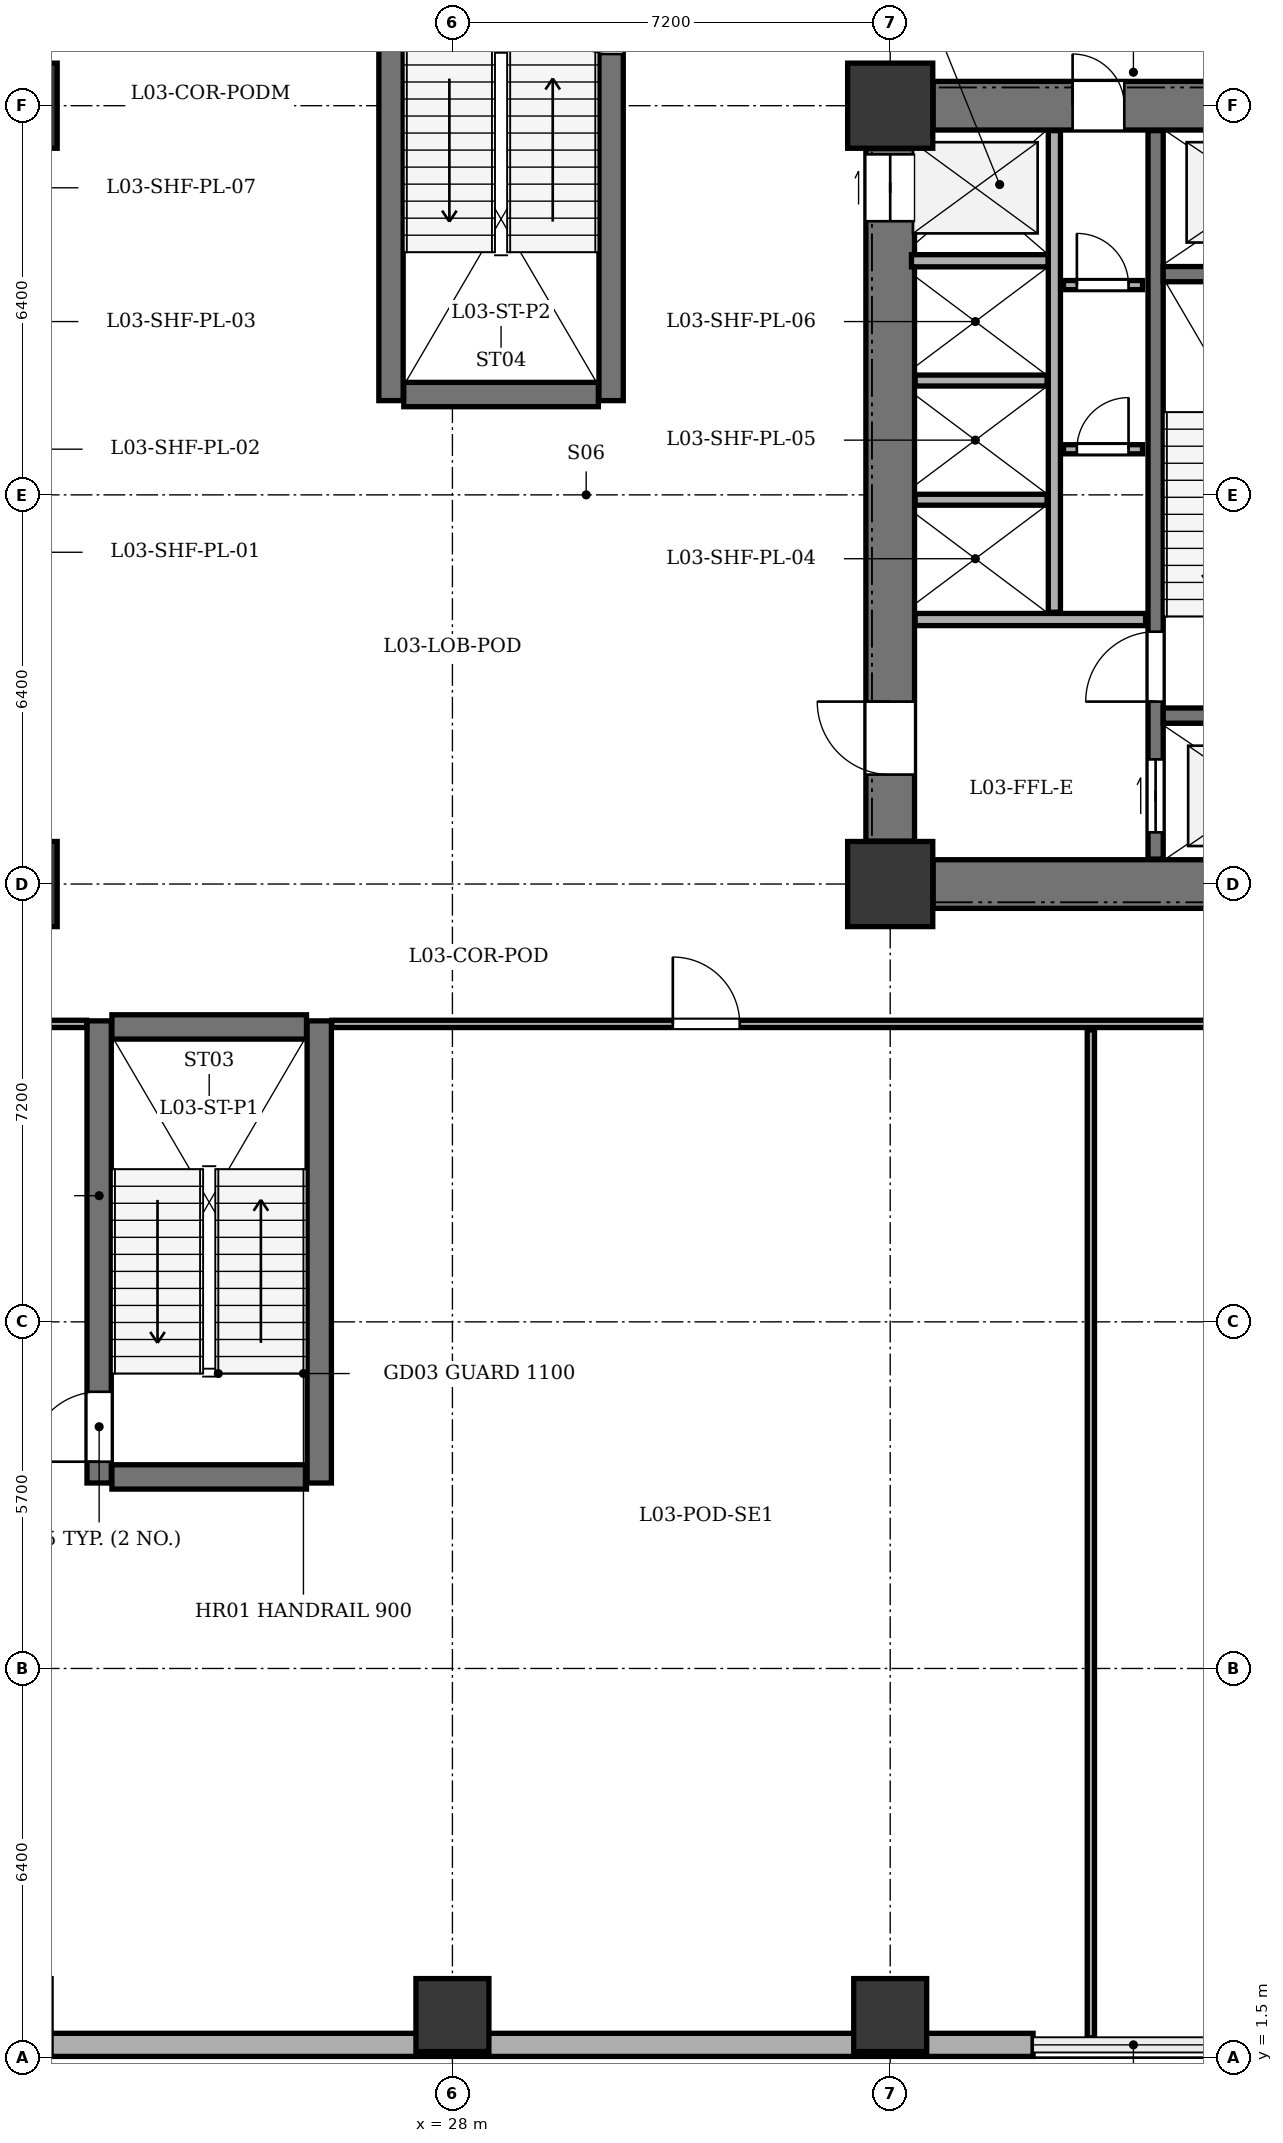
"""IFC4 building model, lengths in metres.
Left out: names, types, materials, properties, quantities, classifications, styles, units other than length and angle.
Written with IfcOpenShell. Run it as: python <this file> out.ifc"""

import sys

from ifc_helpers import new_model, si_unit, direction, frame, frame_2d, origin, origin_2d, place, context, subcontext, project, spatial, rectangle, extrude, element, fill, save


model = new_model("IFC4")
c1 = context("Model", 3, precision=1e-05, world=origin(), true_north=direction((0.0, 1.0)))
c2 = subcontext(c1, "Body", "Model", "MODEL_VIEW")
j1 = project(units=[si_unit("LENGTHUNIT", "METRE"), si_unit("PLANEANGLEUNIT", "RADIAN")], contexts=[c1])
p1 = place(None, origin())
s1 = spatial("IfcSite", under=j1, at=p1, CompositionType="ELEMENT")
p2 = place(p1, origin())
s2 = spatial("IfcBuilding", under=s1, at=p2, CompositionType="ELEMENT")
p3 = place(p2, frame((0.0, 0.0, 14.4)))
s3 = spatial("IfcBuildingStorey", under=s2, at=p3, CompositionType="ELEMENT", Elevation=14.4)
for number, where, z_axis, x_axis in (
    (1, (20.8, 20.8, 0.0), (0.0, 0.0, 1.0), (1.0, 0.0, 0.0)),
    (2, (20.8, 33.6, 0.0), (0.0, 0.0, 1.0), (1.0, 0.0, 0.0)),
    (3, (35.2, 20.8, 0.0), (0.0, 0.0, 1.0), (1.0, 0.0, 0.0)),
    (4, (35.2, 33.6, 0.0), (0.0, 0.0, 1.0), (1.0, 0.0, 0.0)),
):
    element("IfcColumn", number, at=place(p3, frame(where, z_axis=z_axis, x_axis=x_axis)), inside=s3, PredefinedType="COLUMN", context=c2, shape_type="SweptSolid", body=[
        extrude(rectangle(XDim=1.4, YDim=1.4, at=origin_2d()), origin(), (0.0, 0.0, 1.0), 4.5),
    ])
for number, where, z_axis, x_axis in (
    (5, (28.0, 2.2, 0.0), (0.0, 0.0, 1.0), (1.0, 0.0, 0.0)),
    (6, (35.2, 2.2, 0.0), (0.0, 0.0, 1.0), (1.0, 0.0, 0.0)),
):
    element("IfcColumn", number, at=place(p3, frame(where, z_axis=z_axis, x_axis=x_axis)), inside=s3, PredefinedType="COLUMN", context=c2, shape_type="SweptSolid", body=[
        extrude(rectangle(XDim=1.2, YDim=1.2, at=origin_2d()), origin(), (0.0, 0.0, 1.0), 4.5),
    ])
p4 = place(p3, frame((37.55, 1.71, 0.0), z_axis=(0.0, 0.0, 1.0), x_axis=(-1.0, 0.0, 0.0)))
e7 = element("IfcWall", 7, at=p4, inside=s3, PredefinedType="STANDARD", context=c2, shape_type="SweptSolid", body=[
    extrude(rectangle(XDim=32.15, YDim=0.38, at=frame_2d((16.075, 0.0))), origin(), (0.0, 0.0, 1.0), 4.0),
])
p5 = place(p3, frame((35.905, 20.8, 0.0), z_axis=(0.0, 0.0, 1.0), x_axis=(1.0, 0.0, 0.0)))
e8 = element("IfcWall", 8, at=p5, inside=s3, PredefinedType="SHEAR", context=c2, shape_type="SweptSolid", body=[
    extrude(rectangle(XDim=6.59, YDim=0.8, at=frame_2d((3.295, 0.0))), origin(), (0.0, 0.0, 1.0), 4.0),
])
p6 = place(p3, frame((35.905, 33.6, 0.0), z_axis=(0.0, 0.0, 1.0), x_axis=(1.0, 0.0, 0.0)))
e9 = element("IfcWall", 9, at=p6, inside=s3, PredefinedType="SHEAR", context=c2, shape_type="SweptSolid", body=[
    extrude(rectangle(XDim=6.59, YDim=0.8, at=frame_2d((3.295, 0.0))), origin(), (0.0, 0.0, 1.0), 4.0),
])
p7 = place(p6, frame((4.495, 0.0, 0.0)))
e10 = element("IfcOpeningElement", 10, at=p7, cuts=e9, PredefinedType="OPENING", context=c2, shape_type="SweptSolid", body=[
    extrude(rectangle(XDim=1.3, YDim=2.15, at=frame_2d((0.65, 1.075))), frame((0.0, 0.41, 0.0), z_axis=(0.0, -1.0, 0.0), x_axis=(1.0, 0.0, 0.0)), (0.0, 0.0, 1.0), 0.82),
])
p8 = place(p6, frame((2.295, 0.0, 0.0)))
e11 = element("IfcOpeningElement", 11, at=p8, cuts=e9, PredefinedType="OPENING", context=c2, shape_type="SweptSolid", body=[
    extrude(rectangle(XDim=0.85, YDim=2.02, at=frame_2d((0.425, 1.01))), frame((0.0, 0.41, 0.0), z_axis=(0.0, -1.0, 0.0), x_axis=(1.0, 0.0, 0.0)), (0.0, 0.0, 1.0), 0.82),
])
p9 = place(p3, frame((35.2, 21.505, 0.0), z_axis=(0.0, 0.0, 1.0), x_axis=(0.0, 1.0, 0.0)))
e12 = element("IfcWall", 12, at=p9, inside=s3, PredefinedType="SHEAR", context=c2, shape_type="SweptSolid", body=[
    extrude(rectangle(XDim=11.39, YDim=0.8, at=frame_2d((5.695, 0.0))), origin(), (0.0, 0.0, 1.0), 4.0),
])
p10 = place(p9, frame((1.095, 0.0, 0.0)))
e13 = element("IfcOpeningElement", 13, at=p10, cuts=e12, PredefinedType="OPENING", context=c2, shape_type="SweptSolid", body=[
    extrude(rectangle(XDim=1.2, YDim=2.15, at=frame_2d((0.6, 1.075))), frame((0.0, 0.41, 0.0), z_axis=(0.0, -1.0, 0.0), x_axis=(1.0, 0.0, 0.0)), (0.0, 0.0, 1.0), 0.82),
])
p11 = place(p9, frame((10.195, 0.0, 0.0)))
e14 = element("IfcOpeningElement", 14, at=p11, cuts=e12, PredefinedType="OPENING", context=c2, shape_type="SweptSolid", body=[
    extrude(rectangle(XDim=1.1, YDim=2.1, at=frame_2d((0.55, 1.05))), frame((0.0, 0.41, 0.0), z_axis=(0.0, -1.0, 0.0), x_axis=(1.0, 0.0, 0.0)), (0.0, 0.0, 1.0), 0.82),
])
p12 = place(p3, frame((39.565, 21.21, 0.0), z_axis=(0.0, 0.0, 1.0), x_axis=(0.0, 1.0, 0.0)))
e15 = element("IfcWall", 15, at=p12, inside=s3, PredefinedType="SHEAR", context=c2, shape_type="SweptSolid", body=[
    extrude(rectangle(XDim=11.98, YDim=0.25, at=frame_2d((5.99, 0.0))), origin(), (0.0, 0.0, 1.0), 4.0),
])
p13 = place(p12, frame((0.44, 0.0, 0.0)))
e16 = element("IfcOpeningElement", 16, at=p13, cuts=e15, PredefinedType="OPENING", context=c2, shape_type="SweptSolid", body=[
    extrude(rectangle(XDim=1.2, YDim=2.15, at=frame_2d((0.6, 1.075))), frame((0.0, 0.135, 0.0), z_axis=(0.0, -1.0, 0.0), x_axis=(1.0, 0.0, 0.0)), (0.0, 0.0, 1.0), 0.27),
])
p14 = place(p12, frame((2.59, 0.0, 0.0)))
e17 = element("IfcOpeningElement", 17, at=p14, cuts=e15, PredefinedType="OPENING", context=c2, shape_type="SweptSolid", body=[
    extrude(rectangle(XDim=1.15, YDim=2.15, at=frame_2d((0.575, 1.075))), frame((0.0, 0.135, 0.0), z_axis=(0.0, -1.0, 0.0), x_axis=(1.0, 0.0, 0.0)), (0.0, 0.0, 1.0), 0.27),
])
for number, where, z_axis, x_axis in (
    (18, (39.69, 23.57, 0.0), (0.0, 0.0, 1.0), (1.0, 0.0, 0.0)),
    (19, (39.69, 30.83, 0.0), (0.0, 0.0, 1.0), (1.0, 0.0, 0.0)),
):
    element("IfcWall", number, at=place(p3, frame(where, z_axis=z_axis, x_axis=x_axis)), inside=s3, PredefinedType="SHEAR", context=c2, shape_type="SweptSolid", body=[
        extrude(rectangle(XDim=3.1, YDim=0.25, at=frame_2d((1.55, 0.0))), origin(), (0.0, 0.0, 1.0), 4.0),
    ])
p15 = place(p3, frame((35.61, 25.15, 0.0), z_axis=(0.0, 0.0, 1.0), x_axis=(1.0, 0.0, 0.0)))
e20 = element("IfcWall", 20, at=p15, inside=s3, PredefinedType="SOLIDWALL", context=c2, shape_type="SweptSolid", body=[
    extrude(rectangle(XDim=3.79, YDim=0.2, at=frame_2d((1.895, 0.0))), origin(), (0.0, 0.0, 1.0), 4.0),
])
p16 = place(p3, frame((35.55, 31.05, 0.0), z_axis=(0.0, 0.0, 1.0), x_axis=(1.0, 0.0, 0.0)))
e21 = element("IfcWall", 21, at=p16, inside=s3, PredefinedType="SOLIDWALL", context=c2, shape_type="SweptSolid", body=[
    extrude(rectangle(XDim=2.25, YDim=0.2, at=frame_2d((1.125, 0.0))), origin(), (0.0, 0.0, 1.0), 4.0),
])
p17 = place(p3, frame((37.9, 25.27, 0.0), z_axis=(0.0, 0.0, 1.0), x_axis=(0.0, 1.0, 0.0)))
e22 = element("IfcWall", 22, at=p17, inside=s3, PredefinedType="SOLIDWALL", context=c2, shape_type="SweptSolid", body=[
    extrude(rectangle(XDim=7.92, YDim=0.2, at=frame_2d((3.96, 0.0))), origin(), (0.0, 0.0, 1.0), 4.0),
])
for number, where, z_axis, x_axis in (
    (23, (35.61, 27.12, 0.0), (0.0, 0.0, 1.0), (1.0, 0.0, 0.0)),
    (24, (35.61, 29.08, 0.0), (0.0, 0.0, 1.0), (1.0, 0.0, 0.0)),
):
    element("IfcWall", number, at=place(p3, frame(where, z_axis=z_axis, x_axis=x_axis)), inside=s3, PredefinedType="PARTITIONING", context=c2, shape_type="SweptSolid", body=[
        extrude(rectangle(XDim=2.17, YDim=0.18, at=frame_2d((1.085, 0.0))), origin(), (0.0, 0.0, 1.0), 4.0),
    ])
p18 = place(p3, frame((22.19, 10.95, 0.0), z_axis=(0.0, 0.0, 1.0), x_axis=(0.0, 1.0, 0.0)))
e25 = element("IfcWall", 25, at=p18, inside=s3, PredefinedType="SHEAR", context=c2, shape_type="SweptSolid", body=[
    extrude(rectangle(XDim=7.6, YDim=0.4, at=frame_2d((3.8, 0.0))), origin(), (0.0, 0.0, 1.0), 4.0),
])
p19 = place(p18, frame((0.35, 0.0, 0.0)))
e26 = element("IfcOpeningElement", 26, at=p19, cuts=e25, PredefinedType="OPENING", context=c2, shape_type="SweptSolid", body=[
    extrude(rectangle(XDim=1.15, YDim=2.15, at=frame_2d((0.575, 1.075))), frame((0.0, 0.21, 0.0), z_axis=(0.0, -1.0, 0.0), x_axis=(1.0, 0.0, 0.0)), (0.0, 0.0, 1.0), 0.42),
])
p20 = place(p3, frame((25.81, 10.95, 0.0), z_axis=(0.0, 0.0, 1.0), x_axis=(0.0, 1.0, 0.0)))
e27 = element("IfcWall", 27, at=p20, inside=s3, PredefinedType="SHEAR", context=c2, shape_type="SweptSolid", body=[
    extrude(rectangle(XDim=7.6, YDim=0.4, at=frame_2d((3.8, 0.0))), origin(), (0.0, 0.0, 1.0), 4.0),
])
for number, where, z_axis, x_axis in (
    (28, (22.4, 11.05, 0.0), (0.0, 0.0, 1.0), (1.0, 0.0, 0.0)),
    (29, (22.4, 18.45, 0.0), (0.0, 0.0, 1.0), (1.0, 0.0, 0.0)),
):
    element("IfcWall", number, at=place(p3, frame(where, z_axis=z_axis, x_axis=x_axis)), inside=s3, PredefinedType="SHEAR", context=c2, shape_type="SweptSolid", body=[
        extrude(rectangle(XDim=3.2, YDim=0.4, at=frame_2d((1.6, 0.0))), origin(), (0.0, 0.0, 1.0), 4.0),
    ])
p21 = place(p3, frame((26.99, 28.75, 0.0), z_axis=(0.0, 0.0, 1.0), x_axis=(0.0, 1.0, 0.0)))
e30 = element("IfcWall", 30, at=p21, inside=s3, PredefinedType="SHEAR", context=c2, shape_type="SweptSolid", body=[
    extrude(rectangle(XDim=7.6, YDim=0.4, at=frame_2d((3.8, 0.0))), origin(), (0.0, 0.0, 1.0), 4.0),
])
p22 = place(p3, frame((30.61, 28.75, 0.0), z_axis=(0.0, 0.0, 1.0), x_axis=(0.0, 1.0, 0.0)))
e31 = element("IfcWall", 31, at=p22, inside=s3, PredefinedType="SHEAR", context=c2, shape_type="SweptSolid", body=[
    extrude(rectangle(XDim=7.6, YDim=0.4, at=frame_2d((3.8, 0.0))), origin(), (0.0, 0.0, 1.0), 4.0),
])
p23 = place(p22, frame((5.7, 0.0, 0.0)))
e32 = element("IfcOpeningElement", 32, at=p23, cuts=e31, PredefinedType="OPENING", context=c2, shape_type="SweptSolid", body=[
    extrude(rectangle(XDim=1.15, YDim=2.15, at=frame_2d((0.575, 1.075))), frame((0.0, 0.21, 0.0), z_axis=(0.0, -1.0, 0.0), x_axis=(1.0, 0.0, 0.0)), (0.0, 0.0, 1.0), 0.42),
])
p24 = place(p3, frame((27.2, 28.85, 0.0), z_axis=(0.0, 0.0, 1.0), x_axis=(1.0, 0.0, 0.0)))
e33 = element("IfcWall", 33, at=p24, inside=s3, PredefinedType="SHEAR", context=c2, shape_type="SweptSolid", body=[
    extrude(rectangle(XDim=3.2, YDim=0.4, at=frame_2d((1.6, 0.0))), origin(), (0.0, 0.0, 1.0), 4.0),
])
p25 = place(p3, frame((38.05, 27.95, 0.0), z_axis=(0.0, 0.0, 1.0), x_axis=(1.0, 0.0, 0.0)))
e34 = element("IfcWall", 34, at=p25, inside=s3, PredefinedType="PARTITIONING", context=c2, shape_type="SweptSolid", body=[
    extrude(rectangle(XDim=1.3, YDim=0.15, at=frame_2d((0.65, 0.0))), origin(), (0.0, 0.0, 1.0), 4.0),
])
p26 = place(p25, frame((0.22, 0.0, 0.0)))
e35 = element("IfcOpeningElement", 35, at=p26, cuts=e34, PredefinedType="OPENING", context=c2, shape_type="SweptSolid", body=[
    extrude(rectangle(XDim=0.85, YDim=2.02, at=frame_2d((0.425, 1.01))), frame((0.0, 0.085, 0.0), z_axis=(0.0, -1.0, 0.0), x_axis=(1.0, 0.0, 0.0)), (0.0, 0.0, 1.0), 0.17),
])
p27 = place(p3, frame((38.05, 30.65, 0.0), z_axis=(0.0, 0.0, 1.0), x_axis=(1.0, 0.0, 0.0)))
e36 = element("IfcWall", 36, at=p27, inside=s3, PredefinedType="PARTITIONING", context=c2, shape_type="SweptSolid", body=[
    extrude(rectangle(XDim=1.3, YDim=0.15, at=frame_2d((0.65, 0.0))), origin(), (0.0, 0.0, 1.0), 4.0),
])
p28 = place(p27, frame((0.22, 0.0, 0.0)))
e37 = element("IfcOpeningElement", 37, at=p28, cuts=e36, PredefinedType="OPENING", context=c2, shape_type="SweptSolid", body=[
    extrude(rectangle(XDim=0.85, YDim=2.02, at=frame_2d((0.425, 1.01))), frame((0.0, 0.085, 0.0), z_axis=(0.0, -1.0, 0.0), x_axis=(1.0, 0.0, 0.0)), (0.0, 0.0, 1.0), 0.17),
])
p29 = place(p3, frame((2.805, 18.5, 0.0), z_axis=(0.0, 0.0, 1.0), x_axis=(1.0, 0.0, 0.0)))
e38 = element("IfcWall", 38, at=p29, inside=s3, PredefinedType="PARTITIONING", context=c2, shape_type="SweptSolid", body=[
    extrude(rectangle(XDim=19.18, YDim=0.12, at=frame_2d((9.59, 0.0))), origin(), (0.0, 0.0, 1.0), 3.435),
])
p30 = place(p29, frame((4.0, 0.0, 0.0)))
e39 = element("IfcOpeningElement", 39, at=p30, cuts=e38, PredefinedType="OPENING", context=c2, shape_type="SweptSolid", body=[
    extrude(rectangle(XDim=1.1, YDim=2.15, at=frame_2d((0.55, 1.075))), frame((0.0, 0.07, 0.0), z_axis=(0.0, -1.0, 0.0), x_axis=(1.0, 0.0, 0.0)), (0.0, 0.0, 1.0), 0.14),
])
p31 = place(p29, frame((10.8, 0.0, 0.0)))
e40 = element("IfcOpeningElement", 40, at=p31, cuts=e38, PredefinedType="OPENING", context=c2, shape_type="SweptSolid", body=[
    extrude(rectangle(XDim=1.1, YDim=2.15, at=frame_2d((0.55, 1.075))), frame((0.0, 0.07, 0.0), z_axis=(0.0, -1.0, 0.0), x_axis=(1.0, 0.0, 0.0)), (0.0, 0.0, 1.0), 0.14),
])
p32 = place(p3, frame((26.015, 18.5, 0.0), z_axis=(0.0, 0.0, 1.0), x_axis=(1.0, 0.0, 0.0)))
e41 = element("IfcWall", 41, at=p32, inside=s3, PredefinedType="PARTITIONING", context=c2, shape_type="SweptSolid", body=[
    extrude(rectangle(XDim=31.58, YDim=0.12, at=frame_2d((15.79, 0.0))), origin(), (0.0, 0.0, 1.0), 3.435),
])
p33 = place(p32, frame((5.61, 0.0, 0.0)))
e42 = element("IfcOpeningElement", 42, at=p33, cuts=e41, PredefinedType="OPENING", context=c2, shape_type="SweptSolid", body=[
    extrude(rectangle(XDim=1.1, YDim=2.15, at=frame_2d((0.55, 1.075))), frame((0.0, 0.07, 0.0), z_axis=(0.0, -1.0, 0.0), x_axis=(1.0, 0.0, 0.0)), (0.0, 0.0, 1.0), 0.14),
])
p34 = place(p32, frame((17.785, 0.0, 0.0)))
e43 = element("IfcOpeningElement", 43, at=p34, cuts=e41, PredefinedType="OPENING", context=c2, shape_type="SweptSolid", body=[
    extrude(rectangle(XDim=1.1, YDim=2.15, at=frame_2d((0.55, 1.075))), frame((0.0, 0.07, 0.0), z_axis=(0.0, -1.0, 0.0), x_axis=(1.0, 0.0, 0.0)), (0.0, 0.0, 1.0), 0.14),
])
p35 = place(p32, frame((25.935, 0.0, 0.0)))
e44 = element("IfcOpeningElement", 44, at=p35, cuts=e41, PredefinedType="OPENING", context=c2, shape_type="SweptSolid", body=[
    extrude(rectangle(XDim=1.1, YDim=2.15, at=frame_2d((0.55, 1.075))), frame((0.0, 0.07, 0.0), z_axis=(0.0, -1.0, 0.0), x_axis=(1.0, 0.0, 0.0)), (0.0, 0.0, 1.0), 0.14),
])
p36 = place(p3, frame((38.5, 1.825, 0.0), z_axis=(0.0, 0.0, 1.0), x_axis=(0.0, 1.0, 0.0)))
e45 = element("IfcWall", 45, at=p36, inside=s3, PredefinedType="PARTITIONING", context=c2, shape_type="SweptSolid", body=[
    extrude(rectangle(XDim=16.575, YDim=0.12, at=frame_2d((8.288, 0.0))), origin(), (0.0, 0.0, 1.0), 4.0),
])
p37 = place(p8, origin())
e46 = element("IfcDoor", 46, at=p37, inside=s3, OperationType="SINGLE_SWING_LEFT", PredefinedType="DOOR", context=c2, shape_type="SweptSolid", body=[
    extrude(rectangle(XDim=0.85, YDim=2.02, at=frame_2d((0.425, 1.01))), frame((0.0, 0.025, 0.0), z_axis=(0.0, -1.0, 0.0), x_axis=(1.0, 0.0, 0.0)), (0.0, 0.0, 1.0), 0.05),
])
fill(e11, e46)
p38 = place(p10, origin())
e47 = element("IfcDoor", 47, at=p38, inside=s3, OperationType="SINGLE_SWING_RIGHT", PredefinedType="DOOR", context=c2, shape_type="SweptSolid", body=[
    extrude(rectangle(XDim=1.2, YDim=2.15, at=frame_2d((0.6, 1.075))), frame((0.0, 0.025, 0.0), z_axis=(0.0, -1.0, 0.0), x_axis=(1.0, 0.0, 0.0)), (0.0, 0.0, 1.0), 0.05),
])
fill(e13, e47)
p39 = place(p11, origin())
e48 = element("IfcDoor", 48, at=p39, inside=s3, OperationType="DOUBLE_DOOR_SLIDING", PredefinedType="DOOR", context=c2, shape_type="SweptSolid", body=[
    extrude(rectangle(XDim=1.1, YDim=2.1, at=frame_2d((0.55, 1.05))), frame((0.0, 0.025, 0.0), z_axis=(0.0, -1.0, 0.0), x_axis=(1.0, 0.0, 0.0)), (0.0, 0.0, 1.0), 0.05),
])
fill(e14, e48)
p40 = place(p13, origin())
e49 = element("IfcDoor", 49, at=p40, inside=s3, OperationType="DOUBLE_DOOR_SLIDING", PredefinedType="DOOR", context=c2, shape_type="SweptSolid", body=[
    extrude(rectangle(XDim=1.2, YDim=2.15, at=frame_2d((0.6, 1.075))), frame((0.0, 0.025, 0.0), z_axis=(0.0, -1.0, 0.0), x_axis=(1.0, 0.0, 0.0)), (0.0, 0.0, 1.0), 0.05),
])
fill(e16, e49)
p41 = place(p14, origin())
e50 = element("IfcDoor", 50, at=p41, inside=s3, OperationType="SINGLE_SWING_LEFT", PredefinedType="DOOR", context=c2, shape_type="SweptSolid", body=[
    extrude(rectangle(XDim=1.15, YDim=2.15, at=frame_2d((0.575, 1.075))), frame((0.0, 0.025, 0.0), z_axis=(0.0, -1.0, 0.0), x_axis=(1.0, 0.0, 0.0)), (0.0, 0.0, 1.0), 0.05),
])
fill(e17, e50)
p42 = place(p19, origin())
e51 = element("IfcDoor", 51, at=p42, inside=s3, OperationType="SINGLE_SWING_LEFT", PredefinedType="DOOR", context=c2, shape_type="SweptSolid", body=[
    extrude(rectangle(XDim=1.15, YDim=2.15, at=frame_2d((0.575, 1.075))), frame((0.0, 0.025, 0.0), z_axis=(0.0, -1.0, 0.0), x_axis=(1.0, 0.0, 0.0)), (0.0, 0.0, 1.0), 0.05),
])
fill(e26, e51)
p43 = place(p23, origin())
e52 = element("IfcDoor", 52, at=p43, inside=s3, OperationType="SINGLE_SWING_RIGHT", PredefinedType="DOOR", context=c2, shape_type="SweptSolid", body=[
    extrude(rectangle(XDim=1.15, YDim=2.15, at=frame_2d((0.575, 1.075))), frame((0.0, 0.025, 0.0), z_axis=(0.0, -1.0, 0.0), x_axis=(1.0, 0.0, 0.0)), (0.0, 0.0, 1.0), 0.05),
])
fill(e32, e52)
p44 = place(p26, origin())
e53 = element("IfcDoor", 53, at=p44, inside=s3, OperationType="SINGLE_SWING_RIGHT", PredefinedType="DOOR", context=c2, shape_type="SweptSolid", body=[
    extrude(rectangle(XDim=0.85, YDim=2.02, at=frame_2d((0.425, 1.01))), frame((0.0, 0.025, 0.0), z_axis=(0.0, -1.0, 0.0), x_axis=(1.0, 0.0, 0.0)), (0.0, 0.0, 1.0), 0.05),
])
fill(e35, e53)
p45 = place(p28, origin())
e54 = element("IfcDoor", 54, at=p45, inside=s3, OperationType="SINGLE_SWING_LEFT", PredefinedType="DOOR", context=c2, shape_type="SweptSolid", body=[
    extrude(rectangle(XDim=0.85, YDim=2.02, at=frame_2d((0.425, 1.01))), frame((0.0, 0.025, 0.0), z_axis=(0.0, -1.0, 0.0), x_axis=(1.0, 0.0, 0.0)), (0.0, 0.0, 1.0), 0.05),
])
fill(e37, e54)
p46 = place(p33, origin())
e55 = element("IfcDoor", 55, at=p46, inside=s3, OperationType="SINGLE_SWING_LEFT", PredefinedType="DOOR", context=c2, shape_type="SweptSolid", body=[
    extrude(rectangle(XDim=1.1, YDim=2.15, at=frame_2d((0.55, 1.075))), frame((0.0, 0.025, 0.0), z_axis=(0.0, -1.0, 0.0), x_axis=(1.0, 0.0, 0.0)), (0.0, 0.0, 1.0), 0.05),
])
fill(e42, e55)
save(model, sys.argv[1])
